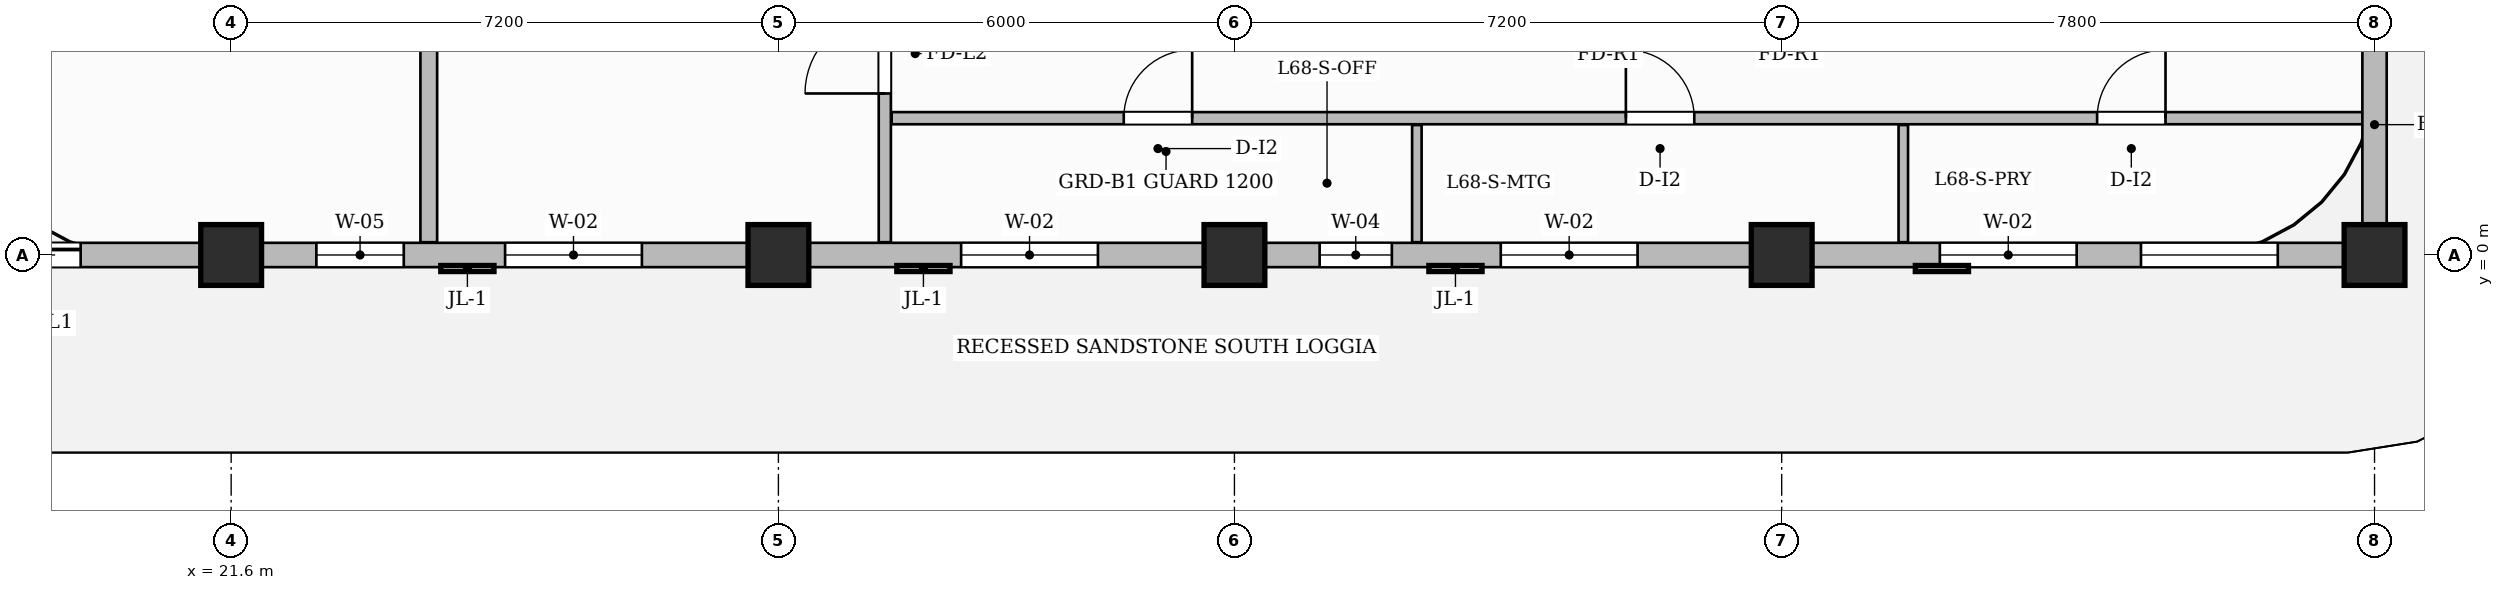
"""IFC4 building model, lengths in metres.
Left out: names, types, materials, properties, quantities, classifications, styles, units other than length and angle.
Written with IfcOpenShell. Run it as: python <this file> out.ifc"""

import sys

from ifc_helpers import new_model, si_unit, direction, frame, frame_2d, origin, origin_2d, place, context, subcontext, project, spatial, rectangle, extrude, source, transform, mapped, element, fill, save


model = new_model("IFC4")
c1 = context("Model", 3, precision=1e-05, world=origin(), true_north=direction((0.0, 1.0)))
c2 = subcontext(c1, "Body", "Model", "MODEL_VIEW")
j1 = project(units=[si_unit("LENGTHUNIT", "METRE"), si_unit("PLANEANGLEUNIT", "RADIAN")], contexts=[c1])
p1 = place(None, origin())
s1 = spatial("IfcSite", under=j1, at=p1, CompositionType="ELEMENT")
p2 = place(p1, origin())
s2 = spatial("IfcBuilding", under=s1, at=p2, CompositionType="ELEMENT")
p3 = place(p2, frame((0.0, 0.0, 271.2)))
s3 = spatial("IfcBuildingStorey", under=s2, at=p3, CompositionType="ELEMENT", Elevation=271.2)
m1 = source(origin(), c2, "Body", "SweptSolid", [
    extrude(rectangle(XDim=0.8, YDim=0.8, at=origin_2d()), origin(), (0.0, 0.0, 1.0), 3.85),
])
for number, where, z_axis, x_axis in (
    (1, (21.6, 0.0, 0.0), (0.0, 0.0, 1.0), (1.0, 0.0, 0.0)),
    (2, (28.8, 0.0, 0.0), (0.0, 0.0, 1.0), (1.0, 0.0, 0.0)),
    (3, (34.8, 0.0, 0.0), (0.0, 0.0, 1.0), (1.0, 0.0, 0.0)),
    (4, (42.0, 0.0, 0.0), (0.0, 0.0, 1.0), (1.0, 0.0, 0.0)),
    (5, (49.8, 0.0, 0.0), (0.0, 0.0, 1.0), (1.0, 0.0, 0.0)),
):
    element("IfcColumn", number, at=place(p3, frame(where, z_axis=z_axis, x_axis=x_axis)), inside=s3, PredefinedType="COLUMN", context=c2, shape_type="MappedRepresentation", body=[
        mapped(m1, transform((0.0, 0.0, 0.0), scale=1.0)),
    ])
p4 = place(p3, frame((30.2, 0.168, 0.0), z_axis=(0.0, 0.0, 1.0), x_axis=(0.0, 1.0, 0.0)))
e6 = element("IfcWall", 6, at=p4, inside=s3, PredefinedType="PARTITIONING", context=c2, shape_type="SweptSolid", body=[
    extrude(rectangle(XDim=9.092, YDim=0.16, at=frame_2d((4.546, 0.0))), origin(), (0.0, 0.0, 1.0), 3.6),
])
p5 = place(p4, frame((1.957, 0.0, 0.0)))
e7 = element("IfcOpeningElement", 7, at=p5, cuts=e6, PredefinedType="OPENING", context=c2, shape_type="SweptSolid", body=[
    extrude(rectangle(XDim=1.05, YDim=2.15, at=frame_2d((0.525, 1.075))), frame((0.0, 0.09, 0.0), z_axis=(0.0, -1.0, 0.0), x_axis=(1.0, 0.0, 0.0)), (0.0, 0.0, 1.0), 0.18),
])
p6 = place(p3, frame((30.29, 1.8, 0.0), z_axis=(0.0, 0.0, 1.0), x_axis=(1.0, 0.0, 0.0)))
e8 = element("IfcWall", 8, at=p6, inside=s3, PredefinedType="PARTITIONING", context=c2, shape_type="SweptSolid", body=[
    extrude(rectangle(XDim=19.37, YDim=0.16, at=frame_2d((9.685, 0.0))), origin(), (0.0, 0.0, 1.0), 3.6),
])
p7 = place(p6, frame((3.054, 0.0, 0.0)))
e9 = element("IfcOpeningElement", 9, at=p7, cuts=e8, PredefinedType="OPENING", context=c2, shape_type="SweptSolid", body=[
    extrude(rectangle(XDim=0.9, YDim=2.15, at=frame_2d((0.45, 1.075))), frame((0.0, 0.09, 0.0), z_axis=(0.0, -1.0, 0.0), x_axis=(1.0, 0.0, 0.0)), (0.0, 0.0, 1.0), 0.18),
])
p8 = place(p6, frame((9.66, 0.0, 0.0)))
e10 = element("IfcOpeningElement", 10, at=p8, cuts=e8, PredefinedType="OPENING", context=c2, shape_type="SweptSolid", body=[
    extrude(rectangle(XDim=0.9, YDim=2.15, at=frame_2d((0.45, 1.075))), frame((0.0, 0.09, 0.0), z_axis=(0.0, -1.0, 0.0), x_axis=(1.0, 0.0, 0.0)), (0.0, 0.0, 1.0), 0.18),
])
p9 = place(p6, frame((15.86, 0.0, 0.0)))
e11 = element("IfcOpeningElement", 11, at=p9, cuts=e8, PredefinedType="OPENING", context=c2, shape_type="SweptSolid", body=[
    extrude(rectangle(XDim=0.9, YDim=2.15, at=frame_2d((0.45, 1.075))), frame((0.0, 0.09, 0.0), z_axis=(0.0, -1.0, 0.0), x_axis=(1.0, 0.0, 0.0)), (0.0, 0.0, 1.0), 0.18),
])
for number, where, z_axis, x_axis in (
    (12, (37.2, 0.168, 0.0), (0.0, 0.0, 1.0), (0.0, 1.0, 0.0)),
    (13, (43.6, 0.168, 0.0), (0.0, 0.0, 1.0), (0.0, 1.0, 0.0)),
):
    element("IfcWall", number, at=place(p3, frame(where, z_axis=z_axis, x_axis=x_axis)), inside=s3, PredefinedType="PARTITIONING", context=c2, shape_type="SweptSolid", body=[
        extrude(rectangle(XDim=1.542, YDim=0.125, at=frame_2d((0.771, 0.0))), origin(), (0.0, 0.0, 1.0), 3.6),
    ])
p10 = place(p3, frame((24.2, 0.168, 0.0), z_axis=(0.0, 0.0, 1.0), x_axis=(0.0, 1.0, 0.0)))
e14 = element("IfcWall", 14, at=p10, inside=s3, PredefinedType="PARTITIONING", context=c2, shape_type="SweptSolid", body=[
    extrude(rectangle(XDim=9.092, YDim=0.22, at=frame_2d((4.546, 0.0))), origin(), (0.0, 0.0, 1.0), 3.6),
])
p11 = place(p3, frame((18.0, 0.0, 0.0), z_axis=(0.0, 0.0, 1.0), x_axis=(1.0, 0.0, 0.0)))
e15 = element("IfcWall", 15, at=p11, inside=s3, PredefinedType="SOLIDWALL", context=c2, shape_type="SweptSolid", body=[
    extrude(rectangle(XDim=31.8, YDim=0.32, at=frame_2d((15.9, 0.0))), origin(), (0.0, 0.0, 1.0), 3.185),
])
p12 = place(p11, frame((0.42, 0.0, 0.0)))
e16 = element("IfcOpeningElement", 16, at=p12, cuts=e15, PredefinedType="OPENING", context=c2, shape_type="SweptSolid", body=[
    extrude(rectangle(XDim=1.2, YDim=2.2, at=frame_2d((0.6, 1.1))), frame((0.0, 0.17, 0.0), z_axis=(0.0, -1.0, 0.0), x_axis=(1.0, 0.0, 0.0)), (0.0, 0.0, 1.0), 0.34),
])
p13 = place(p11, frame((4.721, 0.0, 0.8)))
e17 = element("IfcOpeningElement", 17, at=p13, cuts=e15, PredefinedType="OPENING", context=c2, shape_type="SweptSolid", body=[
    extrude(rectangle(XDim=1.15, YDim=1.8, at=frame_2d((0.575, 0.9))), frame((0.0, 0.17, 0.0), z_axis=(0.0, -1.0, 0.0), x_axis=(1.0, 0.0, 0.0)), (0.0, 0.0, 1.0), 0.34),
])
p14 = place(p11, frame((7.204, 0.0, 0.8)))
e18 = element("IfcOpeningElement", 18, at=p14, cuts=e15, PredefinedType="OPENING", context=c2, shape_type="SweptSolid", body=[
    extrude(rectangle(XDim=1.8, YDim=1.85, at=frame_2d((0.9, 0.925))), frame((0.0, 0.17, 0.0), z_axis=(0.0, -1.0, 0.0), x_axis=(1.0, 0.0, 0.0)), (0.0, 0.0, 1.0), 0.34),
])
p15 = place(p11, frame((13.204, 0.0, 0.8)))
e19 = element("IfcOpeningElement", 19, at=p15, cuts=e15, PredefinedType="OPENING", context=c2, shape_type="SweptSolid", body=[
    extrude(rectangle(XDim=1.8, YDim=1.85, at=frame_2d((0.9, 0.925))), frame((0.0, 0.17, 0.0), z_axis=(0.0, -1.0, 0.0), x_axis=(1.0, 0.0, 0.0)), (0.0, 0.0, 1.0), 0.34),
])
p16 = place(p11, frame((17.921, 0.0, 0.8)))
e20 = element("IfcOpeningElement", 20, at=p16, cuts=e15, PredefinedType="OPENING", context=c2, shape_type="SweptSolid", body=[
    extrude(rectangle(XDim=0.95, YDim=1.75, at=frame_2d((0.475, 0.875))), frame((0.0, 0.17, 0.0), z_axis=(0.0, -1.0, 0.0), x_axis=(1.0, 0.0, 0.0)), (0.0, 0.0, 1.0), 0.34),
])
p17 = place(p11, frame((20.304, 0.0, 0.8)))
e21 = element("IfcOpeningElement", 21, at=p17, cuts=e15, PredefinedType="OPENING", context=c2, shape_type="SweptSolid", body=[
    extrude(rectangle(XDim=1.8, YDim=1.85, at=frame_2d((0.9, 0.925))), frame((0.0, 0.17, 0.0), z_axis=(0.0, -1.0, 0.0), x_axis=(1.0, 0.0, 0.0)), (0.0, 0.0, 1.0), 0.34),
])
p18 = place(p11, frame((26.081, 0.0, 0.8)))
e22 = element("IfcOpeningElement", 22, at=p18, cuts=e15, PredefinedType="OPENING", context=c2, shape_type="SweptSolid", body=[
    extrude(rectangle(XDim=1.8, YDim=1.85, at=frame_2d((0.9, 0.925))), frame((0.0, 0.17, 0.0), z_axis=(0.0, -1.0, 0.0), x_axis=(1.0, 0.0, 0.0)), (0.0, 0.0, 1.0), 0.34),
])
p19 = place(p11, frame((28.727, 0.0, 0.8)))
e23 = element("IfcOpeningElement", 23, at=p19, cuts=e15, PredefinedType="OPENING", context=c2, shape_type="SweptSolid", body=[
    extrude(rectangle(XDim=1.8, YDim=1.85, at=frame_2d((0.9, 0.925))), frame((0.0, 0.17, 0.0), z_axis=(0.0, -1.0, 0.0), x_axis=(1.0, 0.0, 0.0)), (0.0, 0.0, 1.0), 0.34),
])
p20 = place(p3, frame((49.8, 0.05, 0.0), z_axis=(0.0, 0.0, 1.0), x_axis=(0.0, 1.0, 0.0)))
e24 = element("IfcWall", 24, at=p20, inside=s3, PredefinedType="SOLIDWALL", context=c2, shape_type="SweptSolid", body=[
    extrude(rectangle(XDim=3.33, YDim=0.32, at=frame_2d((1.665, 0.0))), origin(), (0.0, 0.0, 1.0), 3.6),
])
m2 = source(origin(), c2, "Body", "SweptSolid", [
    extrude(rectangle(XDim=1.05, YDim=2.15, at=frame_2d((0.525, 1.075))), frame((0.0, 0.025, 0.0), z_axis=(0.0, -1.0, 0.0), x_axis=(1.0, 0.0, 0.0)), (0.0, 0.0, 1.0), 0.05),
])
p21 = place(p5, origin())
e25 = element("IfcDoor", 25, at=p21, inside=s3, OperationType="SINGLE_SWING_LEFT", PredefinedType="DOOR", context=c2, shape_type="MappedRepresentation", body=[
    mapped(m2, transform((0.0, 0.0, 0.0), scale=1.0)),
])
fill(e7, e25)
m3 = source(origin(), c2, "Body", "SweptSolid", [
    extrude(rectangle(XDim=0.9, YDim=2.15, at=frame_2d((0.45, 1.075))), frame((0.0, 0.025, 0.0), z_axis=(0.0, -1.0, 0.0), x_axis=(1.0, 0.0, 0.0)), (0.0, 0.0, 1.0), 0.05),
])
p22 = place(p7, origin())
e26 = element("IfcDoor", 26, at=p22, inside=s3, OperationType="SINGLE_SWING_RIGHT", PredefinedType="DOOR", context=c2, shape_type="MappedRepresentation", body=[
    mapped(m3, transform((0.0, 0.0, 0.0), scale=1.0)),
])
fill(e9, e26)
p23 = place(p8, origin())
e27 = element("IfcDoor", 27, at=p23, inside=s3, OperationType="SINGLE_SWING_LEFT", PredefinedType="DOOR", context=c2, shape_type="MappedRepresentation", body=[
    mapped(m3, transform((0.0, 0.0, 0.0), scale=1.0)),
])
fill(e10, e27)
p24 = place(p9, origin())
e28 = element("IfcDoor", 28, at=p24, inside=s3, OperationType="SINGLE_SWING_RIGHT", PredefinedType="DOOR", context=c2, shape_type="MappedRepresentation", body=[
    mapped(m3, transform((0.0, 0.0, 0.0), scale=1.0)),
])
fill(e11, e28)
m4 = source(origin(), c2, "Body", "SweptSolid", [
    extrude(rectangle(XDim=1.2, YDim=2.2, at=frame_2d((0.6, 1.1))), frame((0.0, 0.025, 0.0), z_axis=(0.0, -1.0, 0.0), x_axis=(1.0, 0.0, 0.0)), (0.0, 0.0, 1.0), 0.05),
])
p25 = place(p12, origin())
e29 = element("IfcDoor", 29, at=p25, inside=s3, OperationType="SLIDING_TO_LEFT", PredefinedType="DOOR", context=c2, shape_type="MappedRepresentation", body=[
    mapped(m4, transform((0.0, 0.0, 0.0), scale=1.0)),
])
fill(e16, e29)
m5 = source(origin(), c2, "Body", "SweptSolid", [
    extrude(rectangle(XDim=1.15, YDim=1.8, at=frame_2d((0.575, 0.9))), frame((0.0, 0.03, 0.0), z_axis=(0.0, -1.0, 0.0), x_axis=(1.0, 0.0, 0.0)), (0.0, 0.0, 1.0), 0.06),
])
p26 = place(p13, origin())
e30 = element("IfcWindow", 30, at=p26, inside=s3, PartitioningType="SINGLE_PANEL", PredefinedType="WINDOW", context=c2, shape_type="MappedRepresentation", body=[
    mapped(m5, transform((0.0, 0.0, 0.0), scale=1.0)),
])
fill(e17, e30)
m6 = source(origin(), c2, "Body", "SweptSolid", [
    extrude(rectangle(XDim=1.8, YDim=1.85, at=frame_2d((0.9, 0.925))), frame((0.0, 0.03, 0.0), z_axis=(0.0, -1.0, 0.0), x_axis=(1.0, 0.0, 0.0)), (0.0, 0.0, 1.0), 0.06),
])
p27 = place(p14, origin())
e31 = element("IfcWindow", 31, at=p27, inside=s3, PartitioningType="DOUBLE_PANEL_VERTICAL", PredefinedType="WINDOW", context=c2, shape_type="MappedRepresentation", body=[
    mapped(m6, transform((0.0, 0.0, 0.0), scale=1.0)),
])
fill(e18, e31)
p28 = place(p15, origin())
e32 = element("IfcWindow", 32, at=p28, inside=s3, PartitioningType="DOUBLE_PANEL_VERTICAL", PredefinedType="WINDOW", context=c2, shape_type="MappedRepresentation", body=[
    mapped(m6, transform((0.0, 0.0, 0.0), scale=1.0)),
])
fill(e19, e32)
m7 = source(origin(), c2, "Body", "SweptSolid", [
    extrude(rectangle(XDim=0.95, YDim=1.75, at=frame_2d((0.475, 0.875))), frame((0.0, 0.03, 0.0), z_axis=(0.0, -1.0, 0.0), x_axis=(1.0, 0.0, 0.0)), (0.0, 0.0, 1.0), 0.06),
])
p29 = place(p16, origin())
e33 = element("IfcWindow", 33, at=p29, inside=s3, PartitioningType="SINGLE_PANEL", PredefinedType="WINDOW", context=c2, shape_type="MappedRepresentation", body=[
    mapped(m7, transform((0.0, 0.0, 0.0), scale=1.0)),
])
fill(e20, e33)
p30 = place(p17, origin())
e34 = element("IfcWindow", 34, at=p30, inside=s3, PartitioningType="DOUBLE_PANEL_VERTICAL", PredefinedType="WINDOW", context=c2, shape_type="MappedRepresentation", body=[
    mapped(m6, transform((0.0, 0.0, 0.0), scale=1.0)),
])
fill(e21, e34)
p31 = place(p18, origin())
e35 = element("IfcWindow", 35, at=p31, inside=s3, PartitioningType="DOUBLE_PANEL_VERTICAL", PredefinedType="WINDOW", context=c2, shape_type="MappedRepresentation", body=[
    mapped(m6, transform((0.0, 0.0, 0.0), scale=1.0)),
])
fill(e22, e35)
p32 = place(p19, origin())
e36 = element("IfcWindow", 36, at=p32, inside=s3, PartitioningType="DOUBLE_PANEL_VERTICAL", PredefinedType="WINDOW", context=c2, shape_type="MappedRepresentation", body=[
    mapped(m6, transform((0.0, 0.0, 0.0), scale=1.0)),
])
fill(e23, e36)
save(model, sys.argv[1])
